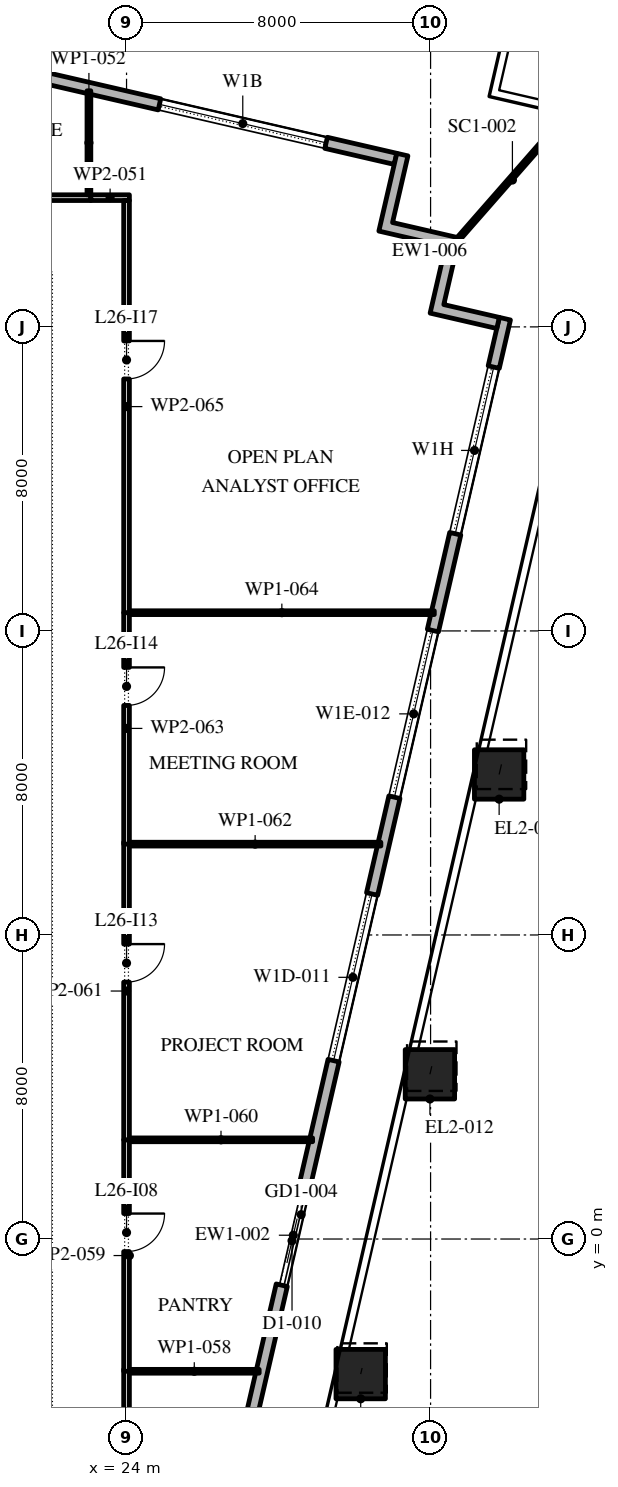
"""IFC4 building model, lengths in metres.
Left out: names, types, materials, properties, quantities, classifications, styles, units other than length and angle.
Written with IfcOpenShell. Run it as: python <this file> out.ifc"""

import sys

from ifc_helpers import new_model, si_unit, direction, frame, frame_2d, origin, origin_2d, place, context, subcontext, project, spatial, polyline, rectangle, outline, extrude, element, fill, save


model = new_model("IFC4")
c1 = context("Model", 3, precision=1e-05, world=origin(), true_north=direction((0.0, 1.0)))
c2 = subcontext(c1, "Body", "Model", "MODEL_VIEW")
j1 = project(units=[si_unit("LENGTHUNIT", "METRE"), si_unit("PLANEANGLEUNIT", "RADIAN")], contexts=[c1])
p1 = place(None, origin())
s1 = spatial("IfcSite", under=j1, at=p1, CompositionType="ELEMENT")
p2 = place(p1, origin())
s2 = spatial("IfcBuilding", under=s1, at=p2, CompositionType="ELEMENT")
p3 = place(p2, frame((0.0, 0.0, 122.4)))
s3 = spatial("IfcBuildingStorey", under=s2, at=p3, CompositionType="ELEMENT", Elevation=122.4)
p4 = place(p3, frame((30.161, -3.554, 0.0), z_axis=(0.008712298116, 0.0379275378, 0.999242511975), x_axis=(-0.974617095667, 0.223878352757, 0.0)))
e1 = element("IfcColumn", 1, at=p4, inside=s3, PredefinedType="COLUMN", context=c2, shape_type="SweptSolid", body=[
    extrude(rectangle(XDim=1.3, YDim=1.3, at=origin_2d()), origin(), (0.0, 0.0, 1.0), 4.203),
])
p5 = place(p3, frame((31.983, 4.334, 0.0), z_axis=(0.011609550877, 0.05055959407, 0.998653566446), x_axis=(-0.974635787342, 0.223796966095, 0.0)))
e2 = element("IfcColumn", 2, at=p5, inside=s3, PredefinedType="COLUMN", context=c2, shape_type="SweptSolid", body=[
    extrude(rectangle(XDim=1.3, YDim=1.3, at=origin_2d()), origin(), (0.0, 0.0, 1.0), 4.206),
])
p6 = place(p3, frame((33.804, 12.223, 0.0), z_axis=(0.014558945825, 0.063166103598, 0.997896828561), x_axis=(-0.97445148511, 0.224598092528, 0.0)))
e3 = element("IfcColumn", 3, at=p6, inside=s3, PredefinedType="COLUMN", context=c2, shape_type="SweptSolid", body=[
    extrude(rectangle(XDim=1.3, YDim=1.3, at=origin_2d()), origin(), (0.0, 0.0, 1.0), 4.209),
])
p7 = place(p3, frame((35.625, 20.112, 0.0), z_axis=(0.017443081717, 0.075683271502, 0.996979328429), x_axis=(-0.974454034257, 0.224587032398, 0.0)))
e4 = element("IfcColumn", 4, at=p7, inside=s3, PredefinedType="COLUMN", context=c2, shape_type="SweptSolid", body=[
    extrude(rectangle(XDim=1.3, YDim=1.3, at=origin_2d()), origin(), (0.0, 0.0, 1.0), 4.213),
])
p8 = place(p3, frame((22.82, -24.016, 0.0), z_axis=(0.0, 0.0, 1.0), x_axis=(0.224953880882, 0.974369412223, 0.0)))
e5 = element("IfcWall", 5, at=p8, inside=s3, PredefinedType="STANDARD", context=c2, shape_type="SweptSolid", body=[
    extrude(rectangle(XDim=49.5, YDim=0.3, at=frame_2d((24.75, 0.0))), origin(), (0.0, 0.0, 1.0), 4.0),
])
p9 = place(p8, frame((1.157, 0.0, 0.45)))
e6 = element("IfcOpeningElement", 6, at=p9, cuts=e5, PredefinedType="OPENING", context=c2, shape_type="SweptSolid", body=[
    extrude(rectangle(XDim=4.5, YDim=3.05, at=frame_2d((2.25, 1.525))), frame((0.0, 0.16, 0.0), z_axis=(0.0, -1.0, 0.0), x_axis=(1.0, 0.0, 0.0)), (0.0, 0.0, 1.0), 0.32),
])
p10 = place(p8, frame((8.121, 0.0, 0.45)))
e7 = element("IfcOpeningElement", 7, at=p10, cuts=e5, PredefinedType="OPENING", context=c2, shape_type="SweptSolid", body=[
    extrude(rectangle(XDim=4.5, YDim=3.05, at=frame_2d((2.25, 1.525))), frame((0.0, 0.16, 0.0), z_axis=(0.0, -1.0, 0.0), x_axis=(1.0, 0.0, 0.0)), (0.0, 0.0, 1.0), 0.32),
])
p11 = place(p8, frame((15.236, 0.0, 0.45)))
e8 = element("IfcOpeningElement", 8, at=p11, cuts=e5, PredefinedType="OPENING", context=c2, shape_type="SweptSolid", body=[
    extrude(rectangle(XDim=4.5, YDim=3.05, at=frame_2d((2.25, 1.525))), frame((0.0, 0.16, 0.0), z_axis=(0.0, -1.0, 0.0), x_axis=(1.0, 0.0, 0.0)), (0.0, 0.0, 1.0), 0.32),
])
p12 = place(p8, frame((23.4, 0.0, 0.0)))
e9 = element("IfcOpeningElement", 9, at=p12, cuts=e5, PredefinedType="OPENING", context=c2, shape_type="SweptSolid", body=[
    extrude(rectangle(XDim=2.4, YDim=3.5, at=frame_2d((1.2, 1.75))), frame((0.0, 0.16, 0.0), z_axis=(0.0, -1.0, 0.0), x_axis=(1.0, 0.0, 0.0)), (0.0, 0.0, 1.0), 0.32),
])
p13 = place(p8, frame((29.464, 0.0, 0.45)))
e10 = element("IfcOpeningElement", 10, at=p13, cuts=e5, PredefinedType="OPENING", context=c2, shape_type="SweptSolid", body=[
    extrude(rectangle(XDim=4.5, YDim=2.875, at=frame_2d((2.25, 1.438))), frame((0.0, 0.16, 0.0), z_axis=(0.0, -1.0, 0.0), x_axis=(1.0, 0.0, 0.0)), (0.0, 0.0, 1.0), 0.32),
])
p14 = place(p8, frame((36.579, 0.0, 0.45)))
e11 = element("IfcOpeningElement", 11, at=p14, cuts=e5, PredefinedType="OPENING", context=c2, shape_type="SweptSolid", body=[
    extrude(rectangle(XDim=4.5, YDim=2.825, at=frame_2d((2.25, 1.413))), frame((0.0, 0.16, 0.0), z_axis=(0.0, -1.0, 0.0), x_axis=(1.0, 0.0, 0.0)), (0.0, 0.0, 1.0), 0.32),
])
p15 = place(p8, frame((43.693, 0.0, 0.45)))
e12 = element("IfcOpeningElement", 12, at=p15, cuts=e5, PredefinedType="OPENING", context=c2, shape_type="SweptSolid", body=[
    extrude(rectangle(XDim=4.5, YDim=2.75, at=frame_2d((2.25, 1.375))), frame((0.0, 0.16, 0.0), z_axis=(0.0, -1.0, 0.0), x_axis=(1.0, 0.0, 0.0)), (0.0, 0.0, 1.0), 0.32),
])
p16 = place(p3, frame((31.078, 28.421, 0.0), z_axis=(0.0, 0.0, 1.0), x_axis=(-0.974370456532, 0.224949357493, 0.0)))
e13 = element("IfcWall", 13, at=p16, inside=s3, PredefinedType="STANDARD", context=c2, shape_type="SweptSolid", body=[
    extrude(rectangle(XDim=51.0, YDim=0.3, at=frame_2d((25.5, 0.0))), origin(), (0.0, 0.0, 1.0), 4.0),
])
p17 = place(p16, frame((1.875, 0.0, 0.45)))
e14 = element("IfcOpeningElement", 14, at=p17, cuts=e13, PredefinedType="OPENING", context=c2, shape_type="SweptSolid", body=[
    extrude(rectangle(XDim=4.5, YDim=2.95, at=frame_2d((2.25, 1.475))), frame((0.0, 0.16, 0.0), z_axis=(0.0, -1.0, 0.0), x_axis=(1.0, 0.0, 0.0)), (0.0, 0.0, 1.0), 0.32),
])
p18 = place(p16, frame((10.275, 0.0, 0.45)))
e15 = element("IfcOpeningElement", 15, at=p18, cuts=e13, PredefinedType="OPENING", context=c2, shape_type="SweptSolid", body=[
    extrude(rectangle(XDim=4.5, YDim=2.875, at=frame_2d((2.25, 1.438))), frame((0.0, 0.16, 0.0), z_axis=(0.0, -1.0, 0.0), x_axis=(1.0, 0.0, 0.0)), (0.0, 0.0, 1.0), 0.32),
])
p19 = place(p16, frame((18.825, 0.0, 0.45)))
e16 = element("IfcOpeningElement", 16, at=p19, cuts=e13, PredefinedType="OPENING", context=c2, shape_type="SweptSolid", body=[
    extrude(rectangle(XDim=4.5, YDim=2.825, at=frame_2d((2.25, 1.413))), frame((0.0, 0.16, 0.0), z_axis=(0.0, -1.0, 0.0), x_axis=(1.0, 0.0, 0.0)), (0.0, 0.0, 1.0), 0.32),
])
p20 = place(p16, frame((27.075, 0.0, 0.0)))
e17 = element("IfcOpeningElement", 17, at=p20, cuts=e13, PredefinedType="OPENING", context=c2, shape_type="SweptSolid", body=[
    extrude(rectangle(XDim=2.4, YDim=3.125, at=frame_2d((1.2, 1.562))), frame((0.0, 0.16, 0.0), z_axis=(0.0, -1.0, 0.0), x_axis=(1.0, 0.0, 0.0)), (0.0, 0.0, 1.0), 0.32),
])
p21 = place(p16, frame((35.925, 0.0, 0.45)))
e18 = element("IfcOpeningElement", 18, at=p21, cuts=e13, PredefinedType="OPENING", context=c2, shape_type="SweptSolid", body=[
    extrude(rectangle(XDim=4.5, YDim=2.575, at=frame_2d((2.25, 1.288))), frame((0.0, 0.16, 0.0), z_axis=(0.0, -1.0, 0.0), x_axis=(1.0, 0.0, 0.0)), (0.0, 0.0, 1.0), 0.32),
])
p22 = place(p16, frame((44.475, 0.0, 0.45)))
e19 = element("IfcOpeningElement", 19, at=p22, cuts=e13, PredefinedType="OPENING", context=c2, shape_type="SweptSolid", body=[
    extrude(rectangle(XDim=4.5, YDim=3.05, at=frame_2d((2.25, 1.525))), frame((0.0, 0.16, 0.0), z_axis=(0.0, -1.0, 0.0), x_axis=(1.0, 0.0, 0.0)), (0.0, 0.0, 1.0), 0.32),
])
p23 = place(p3, origin())
e20 = element("IfcWall", 20, at=p23, inside=s3, PredefinedType="STANDARD", context=c2, shape_type="SweptSolid", body=[
    extrude(outline(polyline([(32.393, 26.116), (30.639, 26.521), (31.111, 28.567), (31.404, 28.5), (30.999, 26.746), (32.753, 26.341), (32.348, 24.587), (33.809, 24.25), (33.742, 23.957), (31.988, 24.362), (32.393, 26.116)])), origin(), (0.0, 0.0, 1.0), 4.0),
])
p24 = place(p3, frame((32.753, 26.341, -0.05), z_axis=(0.0, 0.0, 1.0), x_axis=(0.658943218677, 0.752192684463, 0.0)))
e21 = element("IfcWall", 21, at=p24, inside=s3, PredefinedType="STANDARD", context=c2, shape_type="SweptSolid", body=[
    extrude(rectangle(XDim=4.137, YDim=0.1, at=frame_2d((2.068, 0.0))), origin(), (0.0, 0.0, 1.0), 4.05),
])
p25 = place(p3, frame((14.62, 27.4, 0.0), z_axis=(0.0, 0.0, 1.0), x_axis=(1.0, 0.0, 0.0)))
e22 = element("IfcWall", 22, at=p25, inside=s3, PredefinedType="PARTITIONING", context=c2, shape_type="SweptSolid", body=[
    extrude(rectangle(XDim=8.44, YDim=0.15, at=frame_2d((4.22, 0.0))), origin(), (0.0, 0.0, 1.0), 4.0),
])
p26 = place(p25, frame((2.99, 0.0, 0.0)))
e23 = element("IfcOpeningElement", 23, at=p26, cuts=e22, PredefinedType="OPENING", context=c2, shape_type="SweptSolid", body=[
    extrude(rectangle(XDim=1.0, YDim=2.1, at=frame_2d((0.5, 1.05))), frame((0.0, 0.085, 0.0), z_axis=(0.0, -1.0, 0.0), x_axis=(1.0, 0.0, 0.0)), (0.0, 0.0, 1.0), 0.17),
])
p27 = place(p3, frame((23.06, 27.4, 0.0), z_axis=(0.0, 0.0, 1.0), x_axis=(1.0, 0.0, 0.0)))
e24 = element("IfcWall", 24, at=p27, inside=s3, PredefinedType="PARTITIONING", context=c2, shape_type="SweptSolid", body=[
    extrude(rectangle(XDim=1.015, YDim=0.15, at=frame_2d((0.507, 0.0))), origin(), (0.0, 0.0, 1.0), 4.0),
])
p28 = place(p3, frame((23.01, 30.212, 0.0), z_axis=(0.0, 0.0, 1.0), x_axis=(0.0, -1.0, 0.0)))
e25 = element("IfcWall", 25, at=p28, inside=s3, PredefinedType="PARTITIONING", context=c2, shape_type="SweptSolid", body=[
    extrude(rectangle(XDim=2.737, YDim=0.1, at=frame_2d((1.368, 0.0))), origin(), (0.0, 0.0, 1.0), 4.0),
])
p29 = place(p3, frame((24.0, -3.43, 0.0), z_axis=(0.0, 0.0, 1.0), x_axis=(0.0, -1.0, 0.0)))
e26 = element("IfcWall", 26, at=p29, inside=s3, PredefinedType="PARTITIONING", context=c2, shape_type="SweptSolid", body=[
    extrude(rectangle(XDim=4.195, YDim=0.15, at=frame_2d((2.098, 0.0))), origin(), (0.0, 0.0, 1.0), 4.0),
])
p30 = place(p29, frame((2.12, 0.0, 0.0)))
e27 = element("IfcOpeningElement", 27, at=p30, cuts=e26, PredefinedType="OPENING", context=c2, shape_type="SweptSolid", body=[
    extrude(rectangle(XDim=1.0, YDim=2.1, at=frame_2d((0.5, 1.05))), frame((0.0, 0.085, 0.0), z_axis=(0.0, -1.0, 0.0), x_axis=(1.0, 0.0, 0.0)), (0.0, 0.0, 1.0), 0.17),
])
p31 = place(p3, frame((24.075, -3.48, 0.0), z_axis=(0.0, 0.0, 1.0), x_axis=(1.0, 0.0, 0.0)))
e28 = element("IfcWall", 28, at=p31, inside=s3, PredefinedType="PARTITIONING", context=c2, shape_type="SweptSolid", body=[
    extrude(rectangle(XDim=3.415, YDim=0.1, at=frame_2d((1.708, 0.0))), origin(), (0.0, 0.0, 1.0), 4.0),
])
p32 = place(p3, frame((24.0, 2.61, 0.0), z_axis=(0.0, 0.0, 1.0), x_axis=(0.0, -1.0, 0.0)))
e29 = element("IfcWall", 29, at=p32, inside=s3, PredefinedType="PARTITIONING", context=c2, shape_type="SweptSolid", body=[
    extrude(rectangle(XDim=6.09, YDim=0.15, at=frame_2d((3.045, 0.0))), origin(), (0.0, 0.0, 1.0), 4.0),
])
p33 = place(p32, frame((1.94, 0.0, 0.0)))
e30 = element("IfcOpeningElement", 30, at=p33, cuts=e29, PredefinedType="OPENING", context=c2, shape_type="SweptSolid", body=[
    extrude(rectangle(XDim=1.0, YDim=2.1, at=frame_2d((0.5, 1.05))), frame((0.0, 0.085, 0.0), z_axis=(0.0, -1.0, 0.0), x_axis=(1.0, 0.0, 0.0)), (0.0, 0.0, 1.0), 0.17),
])
p34 = place(p3, frame((24.075, 2.61, 0.0), z_axis=(0.0, 0.0, 1.0), x_axis=(1.0, 0.0, 0.0)))
e31 = element("IfcWall", 31, at=p34, inside=s3, PredefinedType="PARTITIONING", context=c2, shape_type="SweptSolid", body=[
    extrude(rectangle(XDim=4.821, YDim=0.1, at=frame_2d((2.411, 0.0))), origin(), (0.0, 0.0, 1.0), 4.0),
])
p35 = place(p3, frame((24.0, 10.44, 0.0), z_axis=(0.0, 0.0, 1.0), x_axis=(0.0, -1.0, 0.0)))
e32 = element("IfcWall", 32, at=p35, inside=s3, PredefinedType="PARTITIONING", context=c2, shape_type="SweptSolid", body=[
    extrude(rectangle(XDim=7.83, YDim=0.15, at=frame_2d((3.915, 0.0))), origin(), (0.0, 0.0, 1.0), 4.0),
])
p36 = place(p35, frame((2.68, 0.0, 0.0)))
e33 = element("IfcOpeningElement", 33, at=p36, cuts=e32, PredefinedType="OPENING", context=c2, shape_type="SweptSolid", body=[
    extrude(rectangle(XDim=1.0, YDim=2.1, at=frame_2d((0.5, 1.05))), frame((0.0, 0.085, 0.0), z_axis=(0.0, -1.0, 0.0), x_axis=(1.0, 0.0, 0.0)), (0.0, 0.0, 1.0), 0.17),
])
p37 = place(p3, frame((24.075, 10.39, 0.0), z_axis=(0.0, 0.0, 1.0), x_axis=(1.0, 0.0, 0.0)))
e34 = element("IfcWall", 34, at=p37, inside=s3, PredefinedType="PARTITIONING", context=c2, shape_type="SweptSolid", body=[
    extrude(rectangle(XDim=6.617, YDim=0.1, at=frame_2d((3.309, 0.0))), origin(), (0.0, 0.0, 1.0), 4.0),
])
p38 = place(p3, frame((24.0, 16.48, 0.0), z_axis=(0.0, 0.0, 1.0), x_axis=(0.0, -1.0, 0.0)))
e35 = element("IfcWall", 35, at=p38, inside=s3, PredefinedType="PARTITIONING", context=c2, shape_type="SweptSolid", body=[
    extrude(rectangle(XDim=6.09, YDim=0.15, at=frame_2d((3.045, 0.0))), origin(), (0.0, 0.0, 1.0), 4.0),
])
p39 = place(p38, frame((1.44, 0.0, 0.0)))
e36 = element("IfcOpeningElement", 36, at=p39, cuts=e35, PredefinedType="OPENING", context=c2, shape_type="SweptSolid", body=[
    extrude(rectangle(XDim=1.0, YDim=2.1, at=frame_2d((0.5, 1.05))), frame((0.0, 0.085, 0.0), z_axis=(0.0, -1.0, 0.0), x_axis=(1.0, 0.0, 0.0)), (0.0, 0.0, 1.0), 0.17),
])
p40 = place(p3, frame((24.075, 16.48, 0.0), z_axis=(0.0, 0.0, 1.0), x_axis=(1.0, 0.0, 0.0)))
e37 = element("IfcWall", 37, at=p40, inside=s3, PredefinedType="PARTITIONING", context=c2, shape_type="SweptSolid", body=[
    extrude(rectangle(XDim=8.023, YDim=0.1, at=frame_2d((4.011, 0.0))), origin(), (0.0, 0.0, 1.0), 4.0),
])
p41 = place(p3, frame((24.0, 27.325, 0.0), z_axis=(0.0, 0.0, 1.0), x_axis=(0.0, -1.0, 0.0)))
e38 = element("IfcWall", 38, at=p41, inside=s3, PredefinedType="PARTITIONING", context=c2, shape_type="SweptSolid", body=[
    extrude(rectangle(XDim=10.845, YDim=0.15, at=frame_2d((5.422, 0.0))), origin(), (0.0, 0.0, 1.0), 4.0),
])
p42 = place(p41, frame((3.695, 0.0, 0.0)))
e39 = element("IfcOpeningElement", 39, at=p42, cuts=e38, PredefinedType="OPENING", context=c2, shape_type="SweptSolid", body=[
    extrude(rectangle(XDim=1.0, YDim=2.1, at=frame_2d((0.5, 1.05))), frame((0.0, 0.085, 0.0), z_axis=(0.0, -1.0, 0.0), x_axis=(1.0, 0.0, 0.0)), (0.0, 0.0, 1.0), 0.17),
])
p43 = place(p12, origin())
e40 = element("IfcDoor", 40, at=p43, inside=s3, OperationType="DOUBLE_DOOR_SLIDING", PredefinedType="DOOR", context=c2, shape_type="SweptSolid", body=[
    extrude(rectangle(XDim=2.4, YDim=3.5, at=frame_2d((1.2, 1.75))), frame((0.0, 0.025, 0.0), z_axis=(0.0, -1.0, 0.0), x_axis=(1.0, 0.0, 0.0)), (0.0, 0.0, 1.0), 0.05),
])
fill(e9, e40)
p44 = place(p13, origin())
e41 = element("IfcWindow", 41, at=p44, inside=s3, PartitioningType="DOUBLE_PANEL_VERTICAL", PredefinedType="WINDOW", context=c2, shape_type="SweptSolid", body=[
    extrude(rectangle(XDim=4.5, YDim=2.875, at=frame_2d((2.25, 1.438))), frame((0.0, 0.03, 0.0), z_axis=(0.0, -1.0, 0.0), x_axis=(1.0, 0.0, 0.0)), (0.0, 0.0, 1.0), 0.06),
])
fill(e10, e41)
p45 = place(p14, origin())
e42 = element("IfcWindow", 42, at=p45, inside=s3, PartitioningType="DOUBLE_PANEL_VERTICAL", PredefinedType="WINDOW", context=c2, shape_type="SweptSolid", body=[
    extrude(rectangle(XDim=4.5, YDim=2.825, at=frame_2d((2.25, 1.413))), frame((0.0, 0.03, 0.0), z_axis=(0.0, -1.0, 0.0), x_axis=(1.0, 0.0, 0.0)), (0.0, 0.0, 1.0), 0.06),
])
fill(e11, e42)
p46 = place(p15, origin())
e43 = element("IfcWindow", 43, at=p46, inside=s3, PartitioningType="DOUBLE_PANEL_VERTICAL", PredefinedType="WINDOW", context=c2, shape_type="SweptSolid", body=[
    extrude(rectangle(XDim=4.5, YDim=2.75, at=frame_2d((2.25, 1.375))), frame((0.0, 0.03, 0.0), z_axis=(0.0, -1.0, 0.0), x_axis=(1.0, 0.0, 0.0)), (0.0, 0.0, 1.0), 0.06),
])
fill(e12, e43)
p47 = place(p17, origin())
e44 = element("IfcWindow", 44, at=p47, inside=s3, PartitioningType="DOUBLE_PANEL_VERTICAL", PredefinedType="WINDOW", context=c2, shape_type="SweptSolid", body=[
    extrude(rectangle(XDim=4.5, YDim=2.95, at=frame_2d((2.25, 1.475))), frame((0.0, 0.03, 0.0), z_axis=(0.0, -1.0, 0.0), x_axis=(1.0, 0.0, 0.0)), (0.0, 0.0, 1.0), 0.06),
])
fill(e14, e44)
p48 = place(p33, origin())
e45 = element("IfcDoor", 45, at=p48, inside=s3, OperationType="SINGLE_SWING_RIGHT", PredefinedType="DOOR", context=c2, shape_type="SweptSolid", body=[
    extrude(rectangle(XDim=1.0, YDim=2.1, at=frame_2d((0.5, 1.05))), frame((0.0, 0.025, 0.0), z_axis=(0.0, -1.0, 0.0), x_axis=(1.0, 0.0, 0.0)), (0.0, 0.0, 1.0), 0.05),
])
fill(e30, e45)
p49 = place(p36, origin())
e46 = element("IfcDoor", 46, at=p49, inside=s3, OperationType="SINGLE_SWING_RIGHT", PredefinedType="DOOR", context=c2, shape_type="SweptSolid", body=[
    extrude(rectangle(XDim=1.0, YDim=2.1, at=frame_2d((0.5, 1.05))), frame((0.0, 0.025, 0.0), z_axis=(0.0, -1.0, 0.0), x_axis=(1.0, 0.0, 0.0)), (0.0, 0.0, 1.0), 0.05),
])
fill(e33, e46)
p50 = place(p39, origin())
e47 = element("IfcDoor", 47, at=p50, inside=s3, OperationType="SINGLE_SWING_RIGHT", PredefinedType="DOOR", context=c2, shape_type="SweptSolid", body=[
    extrude(rectangle(XDim=1.0, YDim=2.1, at=frame_2d((0.5, 1.05))), frame((0.0, 0.025, 0.0), z_axis=(0.0, -1.0, 0.0), x_axis=(1.0, 0.0, 0.0)), (0.0, 0.0, 1.0), 0.05),
])
fill(e36, e47)
p51 = place(p42, origin())
e48 = element("IfcDoor", 48, at=p51, inside=s3, OperationType="SINGLE_SWING_RIGHT", PredefinedType="DOOR", context=c2, shape_type="SweptSolid", body=[
    extrude(rectangle(XDim=1.0, YDim=2.1, at=frame_2d((0.5, 1.05))), frame((0.0, 0.025, 0.0), z_axis=(0.0, -1.0, 0.0), x_axis=(1.0, 0.0, 0.0)), (0.0, 0.0, 1.0), 0.05),
])
fill(e39, e48)
save(model, sys.argv[1])
